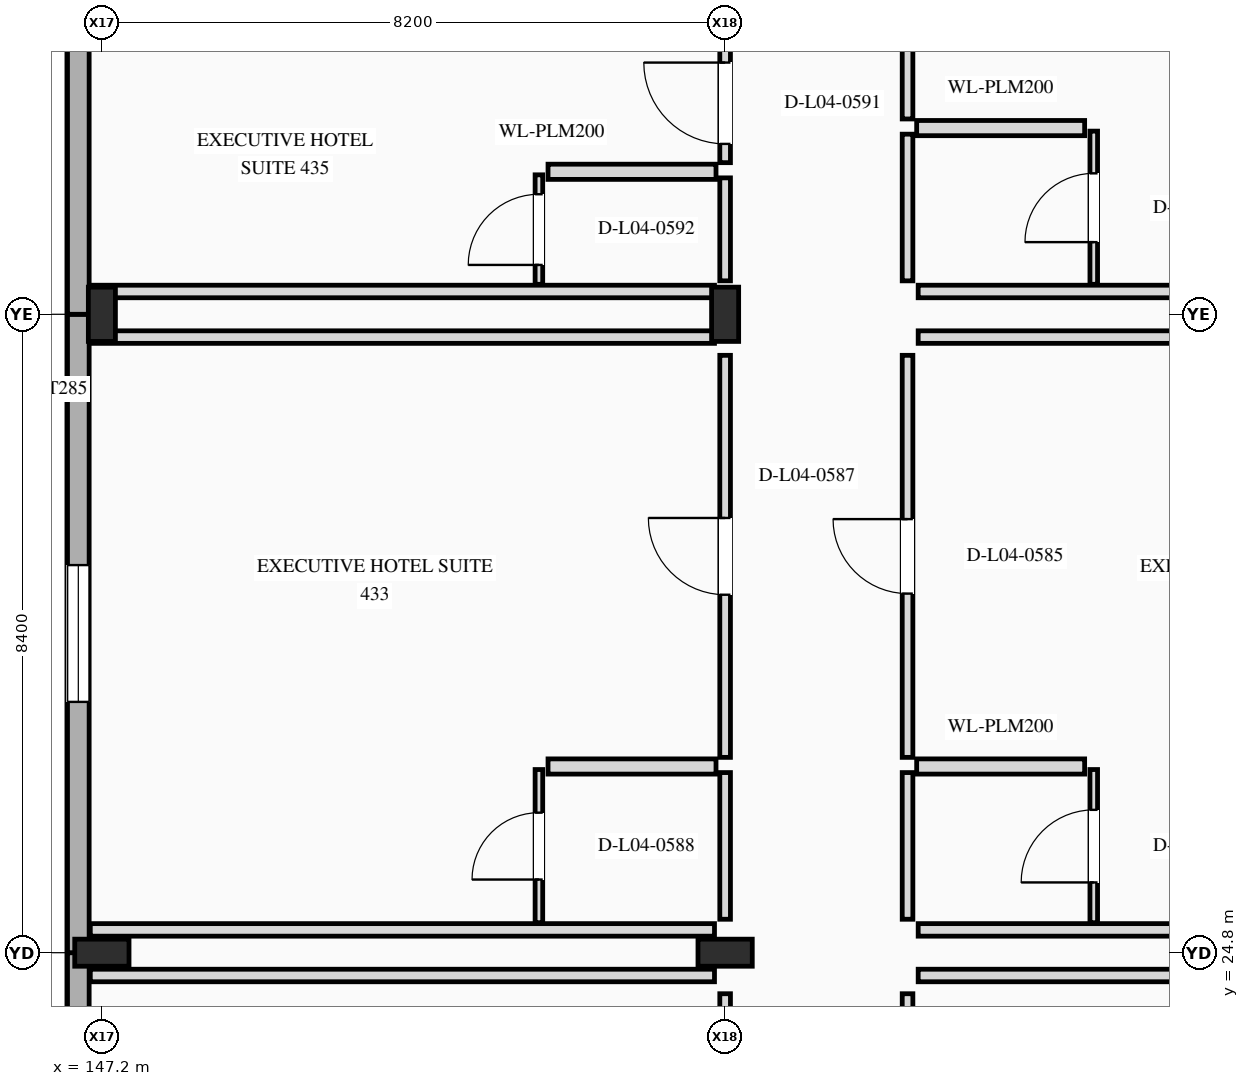
"""IFC4 building model, lengths in metres.
Left out: names, types, materials, properties, quantities, classifications, styles, units other than length and angle.
Written with IfcOpenShell. Run it as: python <this file> out.ifc"""

import sys

from ifc_helpers import new_model, si_unit, direction, frame, frame_2d, origin, origin_2d, place, context, subcontext, project, spatial, rectangle, i_section, extrude, element, fill, save


model = new_model("IFC4")
c1 = context("Model", 3, precision=1e-05, world=origin(), true_north=direction((0.0, 1.0)))
c2 = subcontext(c1, "Body", "Model", "MODEL_VIEW")
j1 = project(units=[si_unit("LENGTHUNIT", "METRE"), si_unit("PLANEANGLEUNIT", "RADIAN")], contexts=[c1])
p1 = place(None, origin())
s1 = spatial("IfcSite", under=j1, at=p1, CompositionType="ELEMENT")
p2 = place(p1, origin())
s2 = spatial("IfcBuilding", under=s1, at=p2, CompositionType="ELEMENT")
p3 = place(p2, frame((0.0, 0.0, 19.5)))
s3 = spatial("IfcBuildingStorey", under=s2, at=p3, CompositionType="ELEMENT", Elevation=19.5)
for number, where, z_axis, x_axis in (
    (1, (147.2, 24.8, 0.0), (0.0, 0.0, 1.0), (0.0, 1.0, 0.0)),
    (2, (147.2, 33.2, 0.0), (0.0, 0.0, 1.0), (1.0, 0.0, 0.0)),
    (3, (155.4, 24.8, 0.0), (0.0, 0.0, 1.0), (0.0, 1.0, 0.0)),
    (4, (155.4, 33.2, 0.0), (0.0, 0.0, 1.0), (1.0, 0.0, 0.0)),
):
    element("IfcColumn", number, at=place(p3, frame(where, z_axis=z_axis, x_axis=x_axis)), inside=s3, PredefinedType="COLUMN", context=c2, shape_type="SweptSolid", body=[
        extrude(i_section(OverallWidth=0.356, OverallDepth=0.714, WebThickness=0.019, FlangeThickness=0.034, at=origin_2d()), origin(), (0.0, 0.0, 1.0), 3.9),
    ])
p4 = place(p3, frame((146.89, 19.254, 0.0), z_axis=(0.0, 0.0, 1.0), x_axis=(0.0, 1.0, 0.0)))
e5 = element("IfcWall", 5, at=p4, inside=s3, PredefinedType="STANDARD", context=c2, shape_type="SweptSolid", body=[
    extrude(rectangle(XDim=5.546, YDim=0.285, at=frame_2d((2.773, 0.0))), origin(), (0.0, 0.0, 1.0), 3.9),
])
p5 = place(p4, frame((2.048, 0.0, 0.85)))
e6 = element("IfcOpeningElement", 6, at=p5, cuts=e5, PredefinedType="OPENING", context=c2, shape_type="SweptSolid", body=[
    extrude(rectangle(XDim=1.1, YDim=1.5, at=frame_2d((0.55, 0.75))), frame((0.0, 0.152, 0.0), z_axis=(0.0, -1.0, 0.0), x_axis=(1.0, 0.0, 0.0)), (0.0, 0.0, 1.0), 0.305),
])
p6 = place(p3, frame((146.89, 24.8, 0.0), z_axis=(0.0, 0.0, 1.0), x_axis=(0.0, 1.0, 0.0)))
e7 = element("IfcWall", 7, at=p6, inside=s3, PredefinedType="STANDARD", context=c2, shape_type="SweptSolid", body=[
    extrude(rectangle(XDim=8.4, YDim=0.285, at=frame_2d((4.2, 0.0))), origin(), (0.0, 0.0, 1.0), 3.9),
])
p7 = place(p6, frame((3.3, 0.0, 0.85)))
e8 = element("IfcOpeningElement", 8, at=p7, cuts=e7, PredefinedType="OPENING", context=c2, shape_type="SweptSolid", body=[
    extrude(rectangle(XDim=1.8, YDim=1.8, at=frame_2d((0.9, 0.9))), frame((0.0, 0.152, 0.0), z_axis=(0.0, -1.0, 0.0), x_axis=(1.0, 0.0, 0.0)), (0.0, 0.0, 1.0), 0.305),
])
p8 = place(p3, frame((146.89, 33.2, 0.0), z_axis=(0.0, 0.0, 1.0), x_axis=(0.0, 1.0, 0.0)))
e9 = element("IfcWall", 9, at=p8, inside=s3, PredefinedType="STANDARD", context=c2, shape_type="SweptSolid", body=[
    extrude(rectangle(XDim=8.4, YDim=0.285, at=frame_2d((4.2, 0.0))), origin(), (0.0, 0.0, 1.0), 3.9),
])
p9 = place(p3, frame((157.8, 21.37, 0.0), z_axis=(0.0, 0.0, 1.0), x_axis=(0.0, 1.0, 0.0)))
e10 = element("IfcWall", 10, at=p9, inside=s3, PredefinedType="PARTITIONING", context=c2, shape_type="SweptSolid", body=[
    extrude(rectangle(XDim=2.89, YDim=0.14, at=frame_2d((1.445, 0.0))), origin(), (0.0, 0.0, 1.0), 3.143),
])
p10 = place(p9, frame((0.985, 0.0, 0.0)))
e11 = element("IfcOpeningElement", 11, at=p10, cuts=e10, PredefinedType="OPENING", context=c2, shape_type="SweptSolid", body=[
    extrude(rectangle(XDim=0.92, YDim=2.15, at=frame_2d((0.46, 1.075))), frame((0.0, 0.08, 0.0), z_axis=(0.0, -1.0, 0.0), x_axis=(1.0, 0.0, 0.0)), (0.0, 0.0, 1.0), 0.16),
])
p11 = place(p3, frame((157.94, 24.5, 0.0), z_axis=(0.0, 0.0, 1.0), x_axis=(1.0, 0.0, 0.0)))
e12 = element("IfcWall", 12, at=p11, inside=s3, PredefinedType="PARTITIONING", context=c2, shape_type="SweptSolid", body=[
    extrude(rectangle(XDim=8.213, YDim=0.165, at=frame_2d((4.106, 0.0))), origin(), (0.0, 0.0, 1.0), 2.975),
])
p12 = place(p3, frame((155.4, 21.37, 0.0), z_axis=(0.0, 0.0, 1.0), x_axis=(0.0, 1.0, 0.0)))
e13 = element("IfcWall", 13, at=p12, inside=s3, PredefinedType="PARTITIONING", context=c2, shape_type="SweptSolid", body=[
    extrude(rectangle(XDim=2.89, YDim=0.14, at=frame_2d((1.445, 0.0))), origin(), (0.0, 0.0, 1.0), 3.059),
])
p13 = place(p12, frame((0.97, 0.0, 0.0)))
e14 = element("IfcOpeningElement", 14, at=p13, cuts=e13, PredefinedType="OPENING", context=c2, shape_type="SweptSolid", body=[
    extrude(rectangle(XDim=0.95, YDim=2.15, at=frame_2d((0.475, 1.075))), frame((0.0, 0.08, 0.0), z_axis=(0.0, -1.0, 0.0), x_axis=(1.0, 0.0, 0.0)), (0.0, 0.0, 1.0), 0.16),
])
p14 = place(p3, frame((147.048, 24.5, 0.0), z_axis=(0.0, 0.0, 1.0), x_axis=(1.0, 0.0, 0.0)))
e15 = element("IfcWall", 15, at=p14, inside=s3, PredefinedType="PARTITIONING", context=c2, shape_type="SweptSolid", body=[
    extrude(rectangle(XDim=8.212, YDim=0.165, at=frame_2d((4.106, 0.0))), origin(), (0.0, 0.0, 1.0), 2.998),
])
p15 = place(p3, frame((157.8, 25.24, 0.0), z_axis=(0.0, 0.0, 1.0), x_axis=(0.0, 1.0, 0.0)))
e16 = element("IfcWall", 16, at=p15, inside=s3, PredefinedType="PARTITIONING", context=c2, shape_type="SweptSolid", body=[
    extrude(rectangle(XDim=1.93, YDim=0.14, at=frame_2d((0.965, 0.0))), origin(), (0.0, 0.0, 1.0), 3.138),
])
p16 = place(p3, frame((157.8, 27.37, 0.0), z_axis=(0.0, 0.0, 1.0), x_axis=(0.0, 1.0, 0.0)))
e17 = element("IfcWall", 17, at=p16, inside=s3, PredefinedType="PARTITIONING", context=c2, shape_type="SweptSolid", body=[
    extrude(rectangle(XDim=5.29, YDim=0.14, at=frame_2d((2.645, 0.0))), origin(), (0.0, 0.0, 1.0), 3.138),
])
p17 = place(p16, frame((2.155, 0.0, 0.0)))
e18 = element("IfcOpeningElement", 18, at=p17, cuts=e17, PredefinedType="OPENING", context=c2, shape_type="SweptSolid", body=[
    extrude(rectangle(XDim=0.98, YDim=2.2, at=frame_2d((0.49, 1.1))), frame((0.0, 0.08, 0.0), z_axis=(0.0, -1.0, 0.0), x_axis=(1.0, 0.0, 0.0)), (0.0, 0.0, 1.0), 0.16),
])
for number, where, z_axis, x_axis in (
    (19, (157.94, 25.1, 0.0), (0.0, 0.0, 1.0), (1.0, 0.0, 0.0)),
    (20, (157.94, 32.9, 0.0), (0.0, 0.0, 1.0), (1.0, 0.0, 0.0)),
):
    element("IfcWall", number, at=place(p3, frame(where, z_axis=z_axis, x_axis=x_axis)), inside=s3, PredefinedType="PARTITIONING", context=c2, shape_type="SweptSolid", body=[
        extrude(rectangle(XDim=8.213, YDim=0.165, at=frame_2d((4.106, 0.0))), origin(), (0.0, 0.0, 1.0), 2.975),
    ])
p18 = place(p3, frame((157.92, 27.25, 0.0), z_axis=(0.0, 0.0, 1.0), x_axis=(1.0, 0.0, 0.0)))
e21 = element("IfcWall", 21, at=p18, inside=s3, PredefinedType="PLUMBINGWALL", context=c2, shape_type="SweptSolid", body=[
    extrude(rectangle(XDim=2.21, YDim=0.2, at=frame_2d((1.105, 0.0))), origin(), (0.0, 0.0, 1.0), 3.585),
])
p19 = place(p3, frame((160.25, 25.195, 0.0), z_axis=(0.0, 0.0, 1.0), x_axis=(0.0, 1.0, 0.0)))
e22 = element("IfcWall", 22, at=p19, inside=s3, PredefinedType="PARTITIONING", context=c2, shape_type="SweptSolid", body=[
    extrude(rectangle(XDim=2.015, YDim=0.1, at=frame_2d((1.008, 0.0))), origin(), (0.0, 0.0, 1.0), 3.138),
])
p20 = place(p19, frame((0.53, 0.0, 0.0)))
e23 = element("IfcOpeningElement", 23, at=p20, cuts=e22, PredefinedType="OPENING", context=c2, shape_type="SweptSolid", body=[
    extrude(rectangle(XDim=0.955, YDim=2.14, at=frame_2d((0.478, 1.07))), frame((0.0, 0.06, 0.0), z_axis=(0.0, -1.0, 0.0), x_axis=(1.0, 0.0, 0.0)), (0.0, 0.0, 1.0), 0.12),
])
p21 = place(p3, frame((155.4, 25.24, 0.0), z_axis=(0.0, 0.0, 1.0), x_axis=(0.0, 1.0, 0.0)))
e24 = element("IfcWall", 24, at=p21, inside=s3, PredefinedType="PARTITIONING", context=c2, shape_type="SweptSolid", body=[
    extrude(rectangle(XDim=1.93, YDim=0.14, at=frame_2d((0.965, 0.0))), origin(), (0.0, 0.0, 1.0), 3.059),
])
p22 = place(p3, frame((155.4, 27.37, 0.0), z_axis=(0.0, 0.0, 1.0), x_axis=(0.0, 1.0, 0.0)))
e25 = element("IfcWall", 25, at=p22, inside=s3, PredefinedType="PARTITIONING", context=c2, shape_type="SweptSolid", body=[
    extrude(rectangle(XDim=5.29, YDim=0.14, at=frame_2d((2.645, 0.0))), origin(), (0.0, 0.0, 1.0), 3.059),
])
p23 = place(p22, frame((2.14, 0.0, 0.0)))
e26 = element("IfcOpeningElement", 26, at=p23, cuts=e25, PredefinedType="OPENING", context=c2, shape_type="SweptSolid", body=[
    extrude(rectangle(XDim=1.01, YDim=2.2, at=frame_2d((0.505, 1.1))), frame((0.0, 0.08, 0.0), z_axis=(0.0, -1.0, 0.0), x_axis=(1.0, 0.0, 0.0)), (0.0, 0.0, 1.0), 0.16),
])
for number, where, z_axis, x_axis in (
    (27, (147.048, 25.1, 0.0), (0.0, 0.0, 1.0), (1.0, 0.0, 0.0)),
    (28, (147.048, 32.9, 0.0), (0.0, 0.0, 1.0), (1.0, 0.0, 0.0)),
):
    element("IfcWall", number, at=place(p3, frame(where, z_axis=z_axis, x_axis=x_axis)), inside=s3, PredefinedType="PARTITIONING", context=c2, shape_type="SweptSolid", body=[
        extrude(rectangle(XDim=8.212, YDim=0.165, at=frame_2d((4.106, 0.0))), origin(), (0.0, 0.0, 1.0), 2.998),
    ])
p24 = place(p3, frame((153.07, 27.25, 0.0), z_axis=(0.0, 0.0, 1.0), x_axis=(1.0, 0.0, 0.0)))
e29 = element("IfcWall", 29, at=p24, inside=s3, PredefinedType="PLUMBINGWALL", context=c2, shape_type="SweptSolid", body=[
    extrude(rectangle(XDim=2.21, YDim=0.2, at=frame_2d((1.105, 0.0))), origin(), (0.0, 0.0, 1.0), 3.585),
])
p25 = place(p3, frame((152.95, 25.195, 0.0), z_axis=(0.0, 0.0, 1.0), x_axis=(0.0, 1.0, 0.0)))
e30 = element("IfcWall", 30, at=p25, inside=s3, PredefinedType="PARTITIONING", context=c2, shape_type="SweptSolid", body=[
    extrude(rectangle(XDim=2.015, YDim=0.1, at=frame_2d((1.008, 0.0))), origin(), (0.0, 0.0, 1.0), 3.193),
])
p26 = place(p25, frame((0.568, 0.0, 0.0)))
e31 = element("IfcOpeningElement", 31, at=p26, cuts=e30, PredefinedType="OPENING", context=c2, shape_type="SweptSolid", body=[
    extrude(rectangle(XDim=0.88, YDim=2.18, at=frame_2d((0.44, 1.09))), frame((0.0, 0.06, 0.0), z_axis=(0.0, -1.0, 0.0), x_axis=(1.0, 0.0, 0.0)), (0.0, 0.0, 1.0), 0.12),
])
p27 = place(p3, frame((157.8, 33.64, 0.0), z_axis=(0.0, 0.0, 1.0), x_axis=(0.0, 1.0, 0.0)))
e32 = element("IfcWall", 32, at=p27, inside=s3, PredefinedType="PARTITIONING", context=c2, shape_type="SweptSolid", body=[
    extrude(rectangle(XDim=1.93, YDim=0.14, at=frame_2d((0.965, 0.0))), origin(), (0.0, 0.0, 1.0), 3.585),
])
p28 = place(p3, frame((157.8, 35.77, 0.0), z_axis=(0.0, 0.0, 1.0), x_axis=(0.0, 1.0, 0.0)))
e33 = element("IfcWall", 33, at=p28, inside=s3, PredefinedType="PARTITIONING", context=c2, shape_type="SweptSolid", body=[
    extrude(rectangle(XDim=5.29, YDim=0.14, at=frame_2d((2.645, 0.0))), origin(), (0.0, 0.0, 1.0), 3.585),
])
p29 = place(p28, frame((2.125, 0.0, 0.0)))
e34 = element("IfcOpeningElement", 34, at=p29, cuts=e33, PredefinedType="OPENING", context=c2, shape_type="SweptSolid", body=[
    extrude(rectangle(XDim=1.04, YDim=2.25, at=frame_2d((0.52, 1.125))), frame((0.0, 0.08, 0.0), z_axis=(0.0, -1.0, 0.0), x_axis=(1.0, 0.0, 0.0)), (0.0, 0.0, 1.0), 0.16),
])
p30 = place(p3, frame((157.94, 33.5, 0.0), z_axis=(0.0, 0.0, 1.0), x_axis=(1.0, 0.0, 0.0)))
e35 = element("IfcWall", 35, at=p30, inside=s3, PredefinedType="PARTITIONING", context=c2, shape_type="SweptSolid", body=[
    extrude(rectangle(XDim=8.213, YDim=0.165, at=frame_2d((4.106, 0.0))), origin(), (0.0, 0.0, 1.0), 2.975),
])
p31 = place(p3, frame((157.92, 35.65, 0.0), z_axis=(0.0, 0.0, 1.0), x_axis=(1.0, 0.0, 0.0)))
e36 = element("IfcWall", 36, at=p31, inside=s3, PredefinedType="PLUMBINGWALL", context=c2, shape_type="SweptSolid", body=[
    extrude(rectangle(XDim=2.21, YDim=0.2, at=frame_2d((1.105, 0.0))), origin(), (0.0, 0.0, 1.0), 3.585),
])
p32 = place(p3, frame((160.25, 33.594, 0.0), z_axis=(0.0, 0.0, 1.0), x_axis=(0.0, 1.0, 0.0)))
e37 = element("IfcWall", 37, at=p32, inside=s3, PredefinedType="PARTITIONING", context=c2, shape_type="SweptSolid", body=[
    extrude(rectangle(XDim=2.016, YDim=0.1, at=frame_2d((1.008, 0.0))), origin(), (0.0, 0.0, 1.0), 3.585),
])
p33 = place(p32, frame((0.555, 0.0, 0.0)))
e38 = element("IfcOpeningElement", 38, at=p33, cuts=e37, PredefinedType="OPENING", context=c2, shape_type="SweptSolid", body=[
    extrude(rectangle(XDim=0.905, YDim=2.18, at=frame_2d((0.453, 1.09))), frame((0.0, 0.06, 0.0), z_axis=(0.0, -1.0, 0.0), x_axis=(1.0, 0.0, 0.0)), (0.0, 0.0, 1.0), 0.12),
])
p34 = place(p3, frame((155.4, 33.64, 0.0), z_axis=(0.0, 0.0, 1.0), x_axis=(0.0, 1.0, 0.0)))
e39 = element("IfcWall", 39, at=p34, inside=s3, PredefinedType="PARTITIONING", context=c2, shape_type="SweptSolid", body=[
    extrude(rectangle(XDim=1.355, YDim=0.14, at=frame_2d((0.678, 0.0))), origin(), (0.0, 0.0, 1.0), 2.975),
])
p35 = place(p3, frame((155.4, 35.195, 0.0), z_axis=(0.0, 0.0, 1.0), x_axis=(0.0, 1.0, 0.0)))
e40 = element("IfcWall", 40, at=p35, inside=s3, PredefinedType="PARTITIONING", context=c2, shape_type="SweptSolid", body=[
    extrude(rectangle(XDim=1.565, YDim=0.14, at=frame_2d((0.782, 0.0))), origin(), (0.0, 0.0, 1.0), 2.975),
])
p36 = place(p35, frame((0.247, 0.0, 0.0)))
e41 = element("IfcOpeningElement", 41, at=p36, cuts=e40, PredefinedType="OPENING", context=c2, shape_type="SweptSolid", body=[
    extrude(rectangle(XDim=1.07, YDim=2.25, at=frame_2d((0.535, 1.125))), frame((0.0, 0.08, 0.0), z_axis=(0.0, -1.0, 0.0), x_axis=(1.0, 0.0, 0.0)), (0.0, 0.0, 1.0), 0.16),
])
p37 = place(p3, frame((147.048, 33.5, 0.0), z_axis=(0.0, 0.0, 1.0), x_axis=(1.0, 0.0, 0.0)))
e42 = element("IfcWall", 42, at=p37, inside=s3, PredefinedType="PARTITIONING", context=c2, shape_type="SweptSolid", body=[
    extrude(rectangle(XDim=8.212, YDim=0.165, at=frame_2d((4.106, 0.0))), origin(), (0.0, 0.0, 1.0), 2.998),
])
p38 = place(p3, frame((153.07, 35.075, 0.0), z_axis=(0.0, 0.0, 1.0), x_axis=(1.0, 0.0, 0.0)))
e43 = element("IfcWall", 43, at=p38, inside=s3, PredefinedType="PLUMBINGWALL", context=c2, shape_type="SweptSolid", body=[
    extrude(rectangle(XDim=2.21, YDim=0.2, at=frame_2d((1.105, 0.0))), origin(), (0.0, 0.0, 1.0), 3.585),
])
p39 = place(p3, frame((152.95, 33.594, 0.0), z_axis=(0.0, 0.0, 1.0), x_axis=(0.0, 1.0, 0.0)))
e44 = element("IfcWall", 44, at=p39, inside=s3, PredefinedType="PARTITIONING", context=c2, shape_type="SweptSolid", body=[
    extrude(rectangle(XDim=1.44, YDim=0.1, at=frame_2d((0.72, 0.0))), origin(), (0.0, 0.0, 1.0), 3.585),
])
p40 = place(p39, frame((0.255, 0.0, 0.0)))
e45 = element("IfcOpeningElement", 45, at=p40, cuts=e44, PredefinedType="OPENING", context=c2, shape_type="SweptSolid", body=[
    extrude(rectangle(XDim=0.93, YDim=2.22, at=frame_2d((0.465, 1.11))), frame((0.0, 0.06, 0.0), z_axis=(0.0, -1.0, 0.0), x_axis=(1.0, 0.0, 0.0)), (0.0, 0.0, 1.0), 0.12),
])
p41 = place(p7, origin())
e46 = element("IfcWindow", 46, at=p41, inside=s3, PartitioningType="SINGLE_PANEL", PredefinedType="WINDOW", context=c2, shape_type="SweptSolid", body=[
    extrude(rectangle(XDim=1.8, YDim=1.8, at=frame_2d((0.9, 0.9))), frame((0.0, 0.03, 0.0), z_axis=(0.0, -1.0, 0.0), x_axis=(1.0, 0.0, 0.0)), (0.0, 0.0, 1.0), 0.06),
])
fill(e8, e46)
p42 = place(p17, origin())
e47 = element("IfcDoor", 47, at=p42, inside=s3, OperationType="SINGLE_SWING_RIGHT", PredefinedType="DOOR", context=c2, shape_type="SweptSolid", body=[
    extrude(rectangle(XDim=0.98, YDim=2.2, at=frame_2d((0.49, 1.1))), frame((0.0, 0.025, 0.0), z_axis=(0.0, -1.0, 0.0), x_axis=(1.0, 0.0, 0.0)), (0.0, 0.0, 1.0), 0.05),
])
fill(e18, e47)
p43 = place(p20, origin())
e48 = element("IfcDoor", 48, at=p43, inside=s3, OperationType="SINGLE_SWING_LEFT", PredefinedType="DOOR", context=c2, shape_type="SweptSolid", body=[
    extrude(rectangle(XDim=0.955, YDim=2.14, at=frame_2d((0.478, 1.07))), frame((0.0, 0.025, 0.0), z_axis=(0.0, -1.0, 0.0), x_axis=(1.0, 0.0, 0.0)), (0.0, 0.0, 1.0), 0.05),
])
fill(e23, e48)
p44 = place(p23, origin())
e49 = element("IfcDoor", 49, at=p44, inside=s3, OperationType="SINGLE_SWING_RIGHT", PredefinedType="DOOR", context=c2, shape_type="SweptSolid", body=[
    extrude(rectangle(XDim=1.01, YDim=2.2, at=frame_2d((0.505, 1.1))), frame((0.0, 0.025, 0.0), z_axis=(0.0, -1.0, 0.0), x_axis=(1.0, 0.0, 0.0)), (0.0, 0.0, 1.0), 0.05),
])
fill(e26, e49)
p45 = place(p26, origin())
e50 = element("IfcDoor", 50, at=p45, inside=s3, OperationType="SINGLE_SWING_LEFT", PredefinedType="DOOR", context=c2, shape_type="SweptSolid", body=[
    extrude(rectangle(XDim=0.88, YDim=2.18, at=frame_2d((0.44, 1.09))), frame((0.0, 0.025, 0.0), z_axis=(0.0, -1.0, 0.0), x_axis=(1.0, 0.0, 0.0)), (0.0, 0.0, 1.0), 0.05),
])
fill(e31, e50)
p46 = place(p33, origin())
e51 = element("IfcDoor", 51, at=p46, inside=s3, OperationType="SINGLE_SWING_LEFT", PredefinedType="DOOR", context=c2, shape_type="SweptSolid", body=[
    extrude(rectangle(XDim=0.905, YDim=2.18, at=frame_2d((0.453, 1.09))), frame((0.0, 0.025, 0.0), z_axis=(0.0, -1.0, 0.0), x_axis=(1.0, 0.0, 0.0)), (0.0, 0.0, 1.0), 0.05),
])
fill(e38, e51)
p47 = place(p36, origin())
e52 = element("IfcDoor", 52, at=p47, inside=s3, OperationType="SINGLE_SWING_RIGHT", PredefinedType="DOOR", context=c2, shape_type="SweptSolid", body=[
    extrude(rectangle(XDim=1.07, YDim=2.25, at=frame_2d((0.535, 1.125))), frame((0.0, 0.025, 0.0), z_axis=(0.0, -1.0, 0.0), x_axis=(1.0, 0.0, 0.0)), (0.0, 0.0, 1.0), 0.05),
])
fill(e41, e52)
p48 = place(p40, origin())
e53 = element("IfcDoor", 53, at=p48, inside=s3, OperationType="SINGLE_SWING_LEFT", PredefinedType="DOOR", context=c2, shape_type="SweptSolid", body=[
    extrude(rectangle(XDim=0.93, YDim=2.22, at=frame_2d((0.465, 1.11))), frame((0.0, 0.025, 0.0), z_axis=(0.0, -1.0, 0.0), x_axis=(1.0, 0.0, 0.0)), (0.0, 0.0, 1.0), 0.05),
])
fill(e45, e53)
save(model, sys.argv[1])
